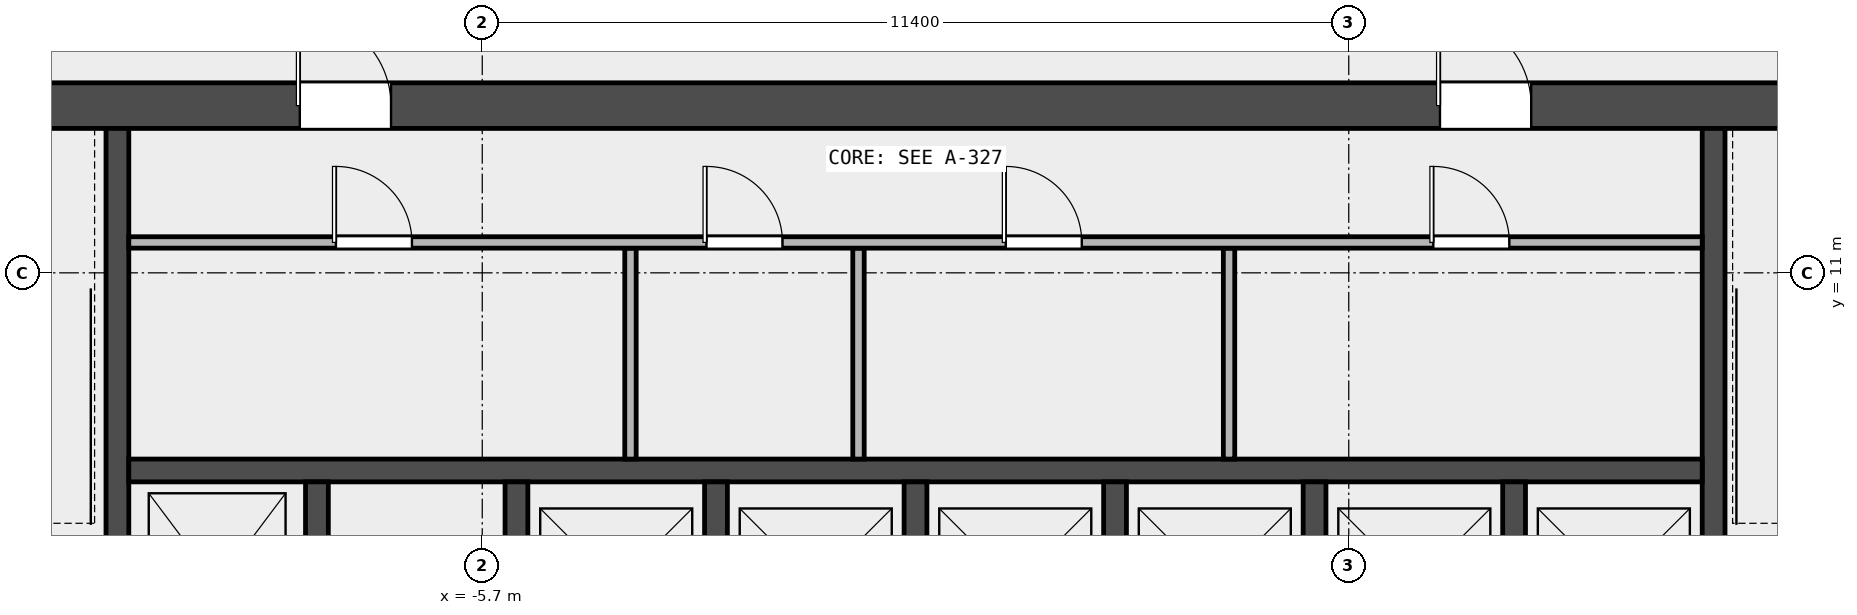
"""IFC4 building model, lengths in metres.
Left out: names, types, materials, properties, quantities, classifications, styles, units other than length and angle.
Written with IfcOpenShell. Run it as: python <this file> out.ifc"""

import sys

from ifc_helpers import new_model, si_unit, direction, frame, frame_2d, origin, place, context, subcontext, project, spatial, rectangle, extrude, element, fill, save


model = new_model("IFC4")
c1 = context("Model", 3, precision=1e-05, world=origin(), true_north=direction((0.0, 1.0)))
c2 = subcontext(c1, "Body", "Model", "MODEL_VIEW")
j1 = project(units=[si_unit("LENGTHUNIT", "METRE"), si_unit("PLANEANGLEUNIT", "RADIAN")], contexts=[c1])
p1 = place(None, origin())
s1 = spatial("IfcSite", under=j1, at=p1, CompositionType="ELEMENT")
p2 = place(p1, origin())
s2 = spatial("IfcBuilding", under=s1, at=p2, CompositionType="ELEMENT")
p3 = place(p2, frame((0.0, 0.0, 283.4)))
s3 = spatial("IfcBuildingStorey", under=s2, at=p3, CompositionType="ELEMENT", Elevation=283.4)
p4 = place(p3, frame((-14.4, 13.2, 0.0), z_axis=(0.0, 0.0, 1.0), x_axis=(1.0, 0.0, 0.0)))
e1 = element("IfcWall", 1, at=p4, inside=s3, PredefinedType="SHEAR", context=c2, shape_type="SweptSolid", body=[
    extrude(rectangle(XDim=28.8, YDim=0.6, at=frame_2d((14.4, 0.0))), origin(), (0.0, 0.0, 1.0), 3.7),
])
p5 = place(p4, frame((6.3, 0.0, 0.0)))
e2 = element("IfcOpeningElement", 2, at=p5, cuts=e1, PredefinedType="OPENING", context=c2, shape_type="SweptSolid", body=[
    extrude(rectangle(XDim=1.2, YDim=2.1, at=frame_2d((0.6, 1.05))), frame((0.0, 0.312, 0.0), z_axis=(0.0, -1.0, 0.0), x_axis=(1.0, 0.0, 0.0)), (0.0, 0.0, 1.0), 0.624),
])
p6 = place(p4, frame((21.3, 0.0, 0.0)))
e3 = element("IfcOpeningElement", 3, at=p6, cuts=e1, PredefinedType="OPENING", context=c2, shape_type="SweptSolid", body=[
    extrude(rectangle(XDim=1.2, YDim=2.1, at=frame_2d((0.6, 1.05))), frame((0.0, 0.312, 0.0), z_axis=(0.0, -1.0, 0.0), x_axis=(1.0, 0.0, 0.0)), (0.0, 0.0, 1.0), 0.624),
])
for number, where, z_axis, x_axis in (
    (4, (-10.5, 5.25, 0.0), (0.0, 0.0, 1.0), (0.0, 1.0, 0.0)),
    (5, (10.5, 5.25, 0.0), (0.0, 0.0, 1.0), (0.0, 1.0, 0.0)),
):
    element("IfcWall", number, at=place(p3, frame(where, z_axis=z_axis, x_axis=x_axis)), inside=s3, PredefinedType="SHEAR", context=c2, shape_type="SweptSolid", body=[
        extrude(rectangle(XDim=7.65, YDim=0.3, at=frame_2d((3.825, 0.0))), origin(), (0.0, 0.0, 1.0), 3.7),
    ])
p7 = place(p3, frame((-10.35, 8.4, 0.0), z_axis=(0.0, 0.0, 1.0), x_axis=(1.0, 0.0, 0.0)))
e6 = element("IfcWall", 6, at=p7, inside=s3, PredefinedType="SOLIDWALL", context=c2, shape_type="SweptSolid", body=[
    extrude(rectangle(XDim=20.7, YDim=0.3, at=frame_2d((10.35, 0.0))), origin(), (0.0, 0.0, 1.0), 3.7),
])
for number, where, z_axis, x_axis in (
    (7, (-7.875, 5.55, 0.0), (0.0, 0.0, 1.0), (0.0, 1.0, 0.0)),
    (8, (-5.25, 5.55, 0.0), (0.0, 0.0, 1.0), (0.0, 1.0, 0.0)),
    (9, (-2.625, 5.55, 0.0), (0.0, 0.0, 1.0), (0.0, 1.0, 0.0)),
    (10, (0.0, 5.55, 0.0), (0.0, 0.0, 1.0), (0.0, 1.0, 0.0)),
    (11, (2.625, 5.55, 0.0), (0.0, 0.0, 1.0), (0.0, 1.0, 0.0)),
    (12, (5.25, 5.55, 0.0), (0.0, 0.0, 1.0), (0.0, 1.0, 0.0)),
    (13, (7.875, 5.55, 0.0), (0.0, 0.0, 1.0), (0.0, 1.0, 0.0)),
):
    element("IfcWall", number, at=place(p3, frame(where, z_axis=z_axis, x_axis=x_axis)), inside=s3, PredefinedType="SOLIDWALL", context=c2, shape_type="SweptSolid", body=[
        extrude(rectangle(XDim=2.7, YDim=0.3, at=frame_2d((1.35, 0.0))), origin(), (0.0, 0.0, 1.0), 3.7),
    ])
for number, where, z_axis, x_axis in (
    (14, (-3.75, 8.55, 0.0), (0.0, 0.0, 1.0), (0.0, 1.0, 0.0)),
    (15, (-0.75, 8.55, 0.0), (0.0, 0.0, 1.0), (0.0, 1.0, 0.0)),
    (16, (4.125, 8.55, 0.0), (0.0, 0.0, 1.0), (0.0, 1.0, 0.0)),
):
    element("IfcWall", number, at=place(p3, frame(where, z_axis=z_axis, x_axis=x_axis)), inside=s3, PredefinedType="PARTITIONING", context=c2, shape_type="SweptSolid", body=[
        extrude(rectangle(XDim=2.775, YDim=0.15, at=frame_2d((1.387, 0.0))), origin(), (0.0, 0.0, 1.0), 3.7),
    ])
p8 = place(p3, frame((-10.35, 11.4, 0.0), z_axis=(0.0, 0.0, 1.0), x_axis=(1.0, 0.0, 0.0)))
e17 = element("IfcWall", 17, at=p8, inside=s3, PredefinedType="PARTITIONING", context=c2, shape_type="SweptSolid", body=[
    extrude(rectangle(XDim=20.7, YDim=0.15, at=frame_2d((10.35, 0.0))), origin(), (0.0, 0.0, 1.0), 3.7),
])
p9 = place(p8, frame((2.725, 0.0, 0.0)))
e18 = element("IfcOpeningElement", 18, at=p9, cuts=e17, PredefinedType="OPENING", context=c2, shape_type="SweptSolid", body=[
    extrude(rectangle(XDim=1.0, YDim=2.1, at=frame_2d((0.5, 1.05))), frame((0.0, 0.087, 0.0), z_axis=(0.0, -1.0, 0.0), x_axis=(1.0, 0.0, 0.0)), (0.0, 0.0, 1.0), 0.174),
])
p10 = place(p8, frame((7.6, 0.0, 0.0)))
e19 = element("IfcOpeningElement", 19, at=p10, cuts=e17, PredefinedType="OPENING", context=c2, shape_type="SweptSolid", body=[
    extrude(rectangle(XDim=1.0, YDim=2.1, at=frame_2d((0.5, 1.05))), frame((0.0, 0.087, 0.0), z_axis=(0.0, -1.0, 0.0), x_axis=(1.0, 0.0, 0.0)), (0.0, 0.0, 1.0), 0.174),
])
p11 = place(p8, frame((11.538, 0.0, 0.0)))
e20 = element("IfcOpeningElement", 20, at=p11, cuts=e17, PredefinedType="OPENING", context=c2, shape_type="SweptSolid", body=[
    extrude(rectangle(XDim=1.0, YDim=2.1, at=frame_2d((0.5, 1.05))), frame((0.0, 0.087, 0.0), z_axis=(0.0, -1.0, 0.0), x_axis=(1.0, 0.0, 0.0)), (0.0, 0.0, 1.0), 0.174),
])
p12 = place(p8, frame((17.163, 0.0, 0.0)))
e21 = element("IfcOpeningElement", 21, at=p12, cuts=e17, PredefinedType="OPENING", context=c2, shape_type="SweptSolid", body=[
    extrude(rectangle(XDim=1.0, YDim=2.1, at=frame_2d((0.5, 1.05))), frame((0.0, 0.087, 0.0), z_axis=(0.0, -1.0, 0.0), x_axis=(1.0, 0.0, 0.0)), (0.0, 0.0, 1.0), 0.174),
])
p13 = place(p9, origin())
e22 = element("IfcDoor", 22, at=p13, inside=s3, OperationType="SINGLE_SWING_LEFT", PredefinedType="DOOR", context=c2, shape_type="SweptSolid", body=[
    extrude(rectangle(XDim=1.0, YDim=2.1, at=frame_2d((0.5, 1.05))), frame((0.0, 0.025, 0.0), z_axis=(0.0, -1.0, 0.0), x_axis=(1.0, 0.0, 0.0)), (0.0, 0.0, 1.0), 0.05),
])
fill(e18, e22)
p14 = place(p10, origin())
e23 = element("IfcDoor", 23, at=p14, inside=s3, OperationType="SINGLE_SWING_LEFT", PredefinedType="DOOR", context=c2, shape_type="SweptSolid", body=[
    extrude(rectangle(XDim=1.0, YDim=2.1, at=frame_2d((0.5, 1.05))), frame((0.0, 0.025, 0.0), z_axis=(0.0, -1.0, 0.0), x_axis=(1.0, 0.0, 0.0)), (0.0, 0.0, 1.0), 0.05),
])
fill(e19, e23)
p15 = place(p11, origin())
e24 = element("IfcDoor", 24, at=p15, inside=s3, OperationType="SINGLE_SWING_LEFT", PredefinedType="DOOR", context=c2, shape_type="SweptSolid", body=[
    extrude(rectangle(XDim=1.0, YDim=2.1, at=frame_2d((0.5, 1.05))), frame((0.0, 0.025, 0.0), z_axis=(0.0, -1.0, 0.0), x_axis=(1.0, 0.0, 0.0)), (0.0, 0.0, 1.0), 0.05),
])
fill(e20, e24)
p16 = place(p12, origin())
e25 = element("IfcDoor", 25, at=p16, inside=s3, OperationType="SINGLE_SWING_LEFT", PredefinedType="DOOR", context=c2, shape_type="SweptSolid", body=[
    extrude(rectangle(XDim=1.0, YDim=2.1, at=frame_2d((0.5, 1.05))), frame((0.0, 0.025, 0.0), z_axis=(0.0, -1.0, 0.0), x_axis=(1.0, 0.0, 0.0)), (0.0, 0.0, 1.0), 0.05),
])
fill(e21, e25)
p17 = place(p5, origin())
e26 = element("IfcDoor", 26, at=p17, inside=s3, OperationType="SINGLE_SWING_LEFT", PredefinedType="DOOR", context=c2, shape_type="SweptSolid", body=[
    extrude(rectangle(XDim=1.2, YDim=2.1, at=frame_2d((0.6, 1.05))), frame((0.0, 0.025, 0.0), z_axis=(0.0, -1.0, 0.0), x_axis=(1.0, 0.0, 0.0)), (0.0, 0.0, 1.0), 0.05),
])
fill(e2, e26)
p18 = place(p6, origin())
e27 = element("IfcDoor", 27, at=p18, inside=s3, OperationType="SINGLE_SWING_RIGHT", PredefinedType="DOOR", context=c2, shape_type="SweptSolid", body=[
    extrude(rectangle(XDim=1.2, YDim=2.1, at=frame_2d((0.6, 1.05))), frame((0.0, 0.025, 0.0), z_axis=(0.0, -1.0, 0.0), x_axis=(1.0, 0.0, 0.0)), (0.0, 0.0, 1.0), 0.05),
])
fill(e3, e27)
save(model, sys.argv[1])
